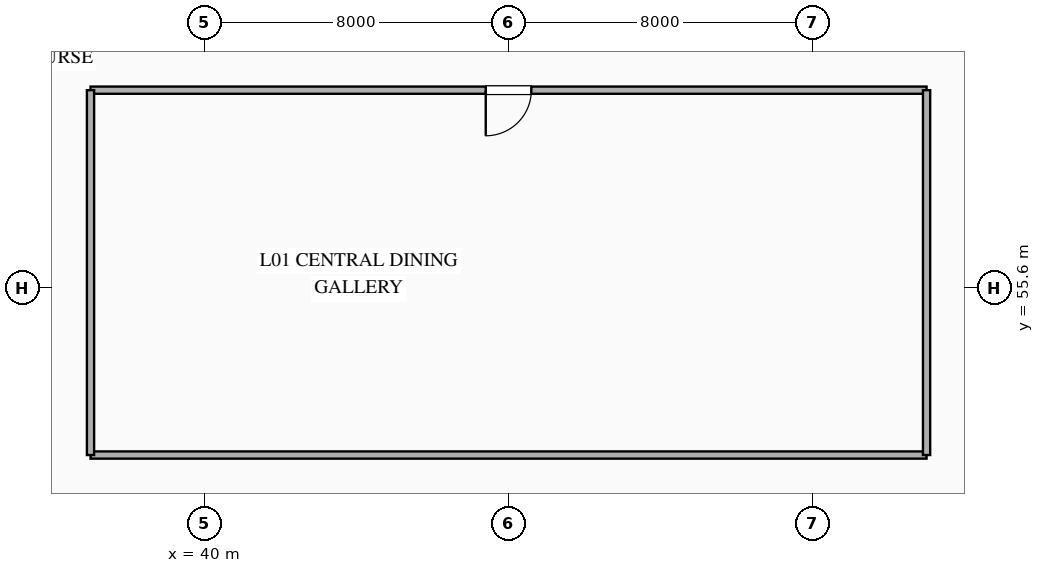
"""IFC4 building model, lengths in metres.
Left out: names, types, materials, properties, quantities, classifications, styles, units other than length and angle.
Written with IfcOpenShell. Run it as: python <this file> out.ifc"""

import sys

from ifc_helpers import new_model, si_unit, direction, frame, frame_2d, origin, place, context, subcontext, project, spatial, rectangle, extrude, element, fill, save


model = new_model("IFC4")
c1 = context("Model", 3, precision=1e-05, world=origin(), true_north=direction((0.0, 1.0)))
c2 = subcontext(c1, "Body", "Model", "MODEL_VIEW")
j1 = project(units=[si_unit("LENGTHUNIT", "METRE"), si_unit("PLANEANGLEUNIT", "RADIAN")], contexts=[c1])
p1 = place(None, origin())
s1 = spatial("IfcSite", under=j1, at=p1, CompositionType="ELEMENT")
p2 = place(p1, origin())
s2 = spatial("IfcBuilding", under=s1, at=p2, CompositionType="ELEMENT")
p3 = place(p2, frame((0.0, 0.0, 6.0)))
s3 = spatial("IfcBuildingStorey", under=s2, at=p3, CompositionType="ELEMENT", Elevation=6.0)
p4 = place(p3, frame((59.0, 60.8, 0.0), z_axis=(0.0, 0.0, 1.0), x_axis=(-1.0, 0.0, 0.0)))
e1 = element("IfcWall", 1, at=p4, inside=s3, PredefinedType="PARTITIONING", context=c2, shape_type="SweptSolid", body=[
    extrude(rectangle(XDim=22.0, YDim=0.19, at=frame_2d((11.0, 0.0))), origin(), (0.0, 0.0, 1.0), 4.32),
])
p5 = place(p4, frame((10.4, 0.0, 0.0)))
e2 = element("IfcOpeningElement", 2, at=p5, cuts=e1, PredefinedType="OPENING", context=c2, shape_type="SweptSolid", body=[
    extrude(rectangle(XDim=1.2, YDim=2.25, at=frame_2d((0.6, 1.125))), frame((0.0, 0.105, 0.0), z_axis=(0.0, -1.0, 0.0), x_axis=(1.0, 0.0, 0.0)), (0.0, 0.0, 1.0), 0.21),
])
p6 = place(p3, frame((37.0, 51.2, 0.0), z_axis=(0.0, 0.0, 1.0), x_axis=(1.0, 0.0, 0.0)))
e3 = element("IfcWall", 3, at=p6, inside=s3, PredefinedType="PARTITIONING", context=c2, shape_type="SweptSolid", body=[
    extrude(rectangle(XDim=22.0, YDim=0.19, at=frame_2d((11.0, 0.0))), origin(), (0.0, 0.0, 1.0), 4.32),
])
for number, where, z_axis, x_axis in (
    (4, (59.0, 51.2, 0.0), (0.0, 0.0, 1.0), (0.0, 1.0, 0.0)),
    (5, (37.0, 60.8, 0.0), (0.0, 0.0, 1.0), (0.0, -1.0, 0.0)),
):
    element("IfcWall", number, at=place(p3, frame(where, z_axis=z_axis, x_axis=x_axis)), inside=s3, PredefinedType="PARTITIONING", context=c2, shape_type="SweptSolid", body=[
        extrude(rectangle(XDim=9.6, YDim=0.19, at=frame_2d((4.8, 0.0))), origin(), (0.0, 0.0, 1.0), 4.32),
    ])
p7 = place(p5, origin())
e6 = element("IfcDoor", 6, at=p7, inside=s3, OperationType="SINGLE_SWING_RIGHT", PredefinedType="DOOR", context=c2, shape_type="SweptSolid", body=[
    extrude(rectangle(XDim=1.2, YDim=2.25, at=frame_2d((0.6, 1.125))), frame((0.0, 0.025, 0.0), z_axis=(0.0, -1.0, 0.0), x_axis=(1.0, 0.0, 0.0)), (0.0, 0.0, 1.0), 0.05),
])
fill(e2, e6)
save(model, sys.argv[1])
